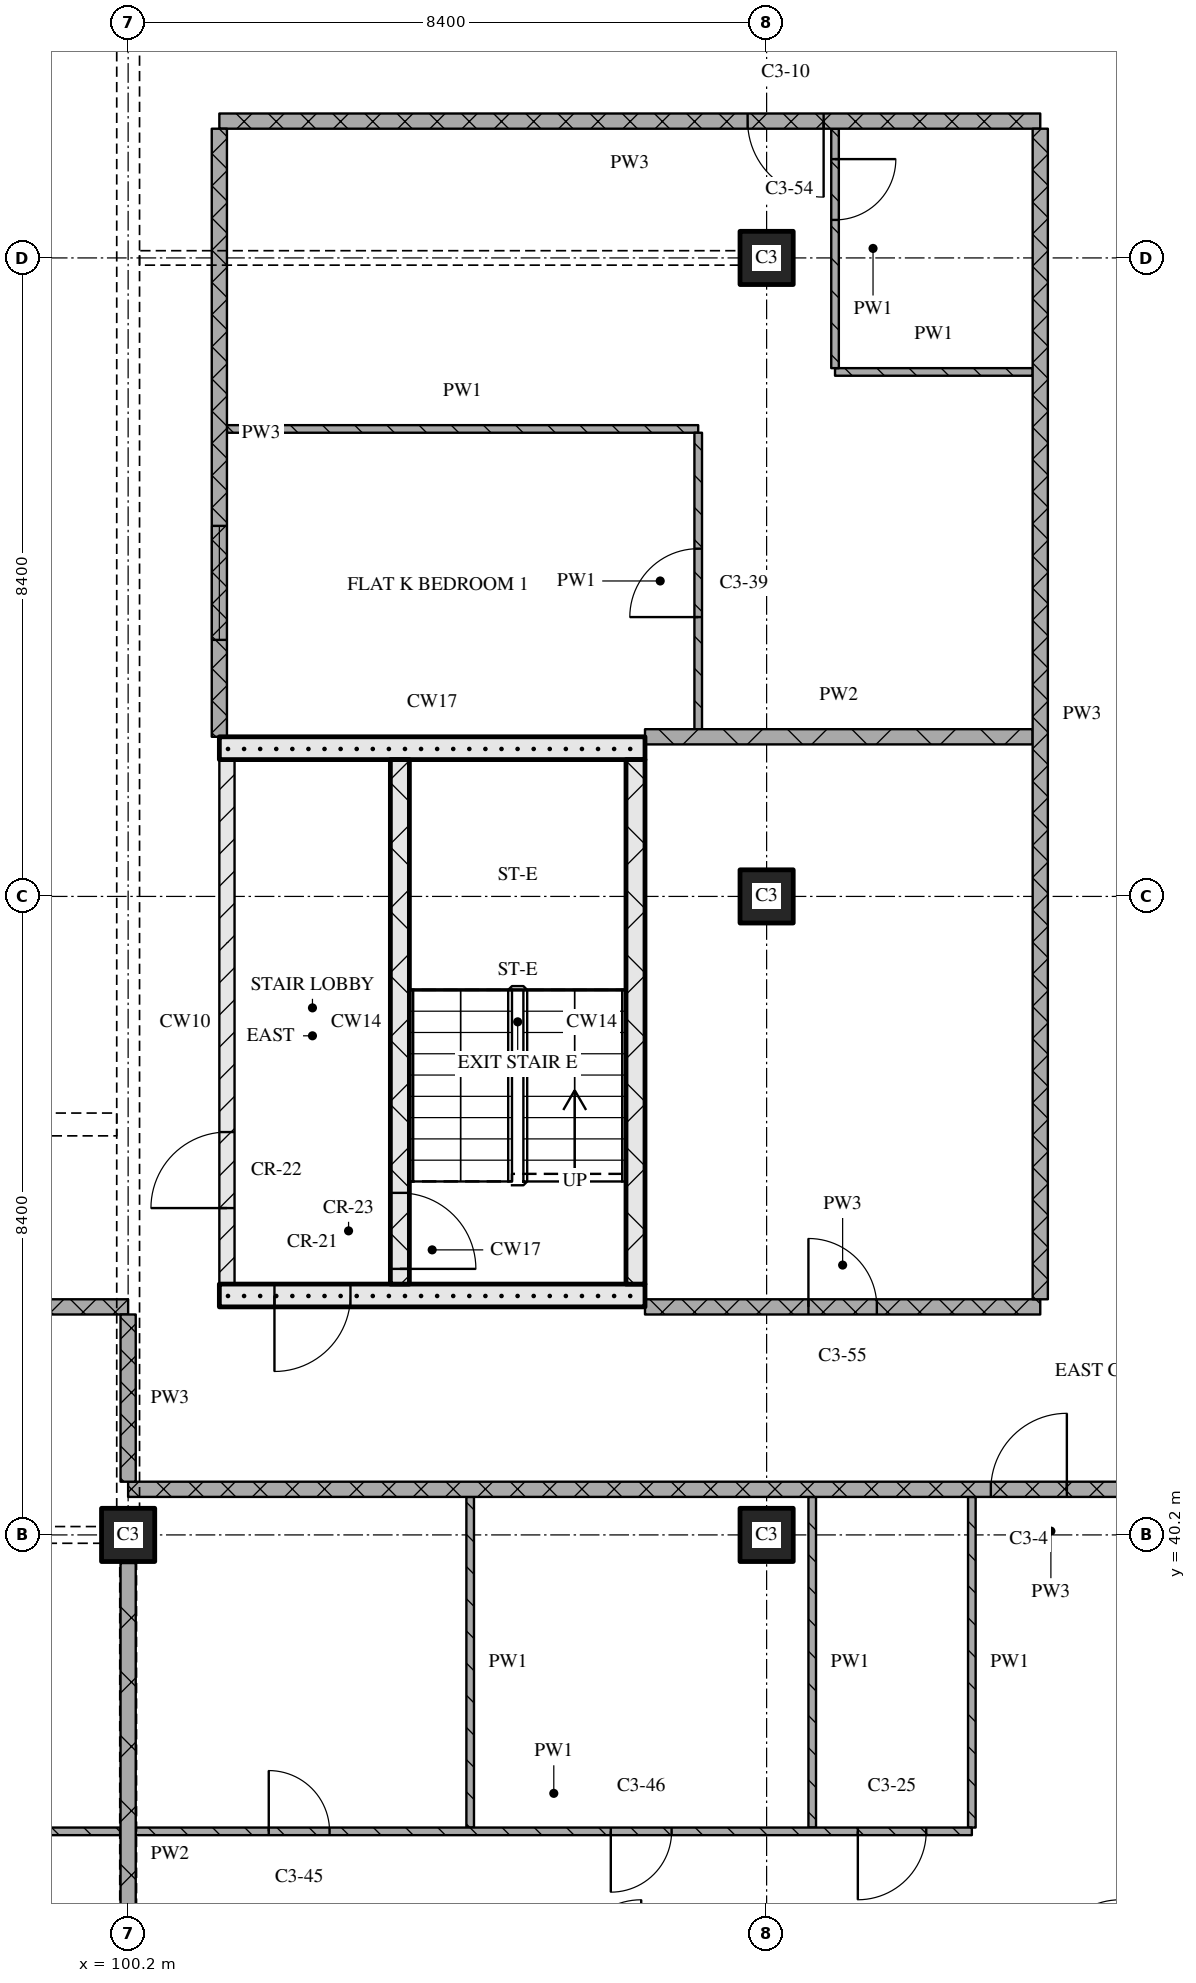
"""IFC4 building model, lengths in metres.
Left out: names, types, materials, properties, quantities, classifications, styles, units other than length and angle.
Written with IfcOpenShell. Run it as: python <this file> out.ifc"""

import sys

from ifc_helpers import new_model, si_unit, direction, frame, frame_2d, origin, origin_2d, place, context, subcontext, project, spatial, rectangle, extrude, element, fill, save


model = new_model("IFC4")
c1 = context("Model", 3, precision=1e-05, world=origin(), true_north=direction((0.0, 1.0)))
c2 = subcontext(c1, "Body", "Model", "MODEL_VIEW")
j1 = project(units=[si_unit("LENGTHUNIT", "METRE"), si_unit("PLANEANGLEUNIT", "RADIAN")], contexts=[c1])
p1 = place(None, origin())
s1 = spatial("IfcSite", under=j1, at=p1, CompositionType="ELEMENT")
p2 = place(p1, origin())
s2 = spatial("IfcBuilding", under=s1, at=p2, CompositionType="ELEMENT")
p3 = place(p2, frame((0.0, 0.0, 172.65)))
s3 = spatial("IfcBuildingStorey", under=s2, at=p3, CompositionType="ELEMENT", Elevation=172.65)
for number, where, z_axis, x_axis in (
    (1, (100.2, 40.2, 0.0), (0.0, 0.0, 1.0), (1.0, 0.0, 0.0)),
    (2, (108.6, 40.2, 0.0), (0.0, 0.0, 1.0), (1.0, 0.0, 0.0)),
    (3, (108.6, 48.6, 0.0), (0.0, 0.0, 1.0), (1.0, 0.0, 0.0)),
    (4, (108.6, 57.0, 0.0), (0.0, 0.0, 1.0), (1.0, 0.0, 0.0)),
):
    element("IfcColumn", number, at=place(p3, frame(where, z_axis=z_axis, x_axis=x_axis)), inside=s3, PredefinedType="COLUMN", context=c2, shape_type="SweptSolid", body=[
        extrude(rectangle(XDim=0.7, YDim=0.7, at=origin_2d()), origin(), (0.0, 0.0, 1.0), 3.6),
    ])
p4 = place(p3, frame((101.4, 43.35, 0.0), z_axis=(0.0, 0.0, 1.0), x_axis=(1.0, 0.0, 0.0)))
e5 = element("IfcWall", 5, at=p4, inside=s3, PredefinedType="SOLIDWALL", context=c2, shape_type="SweptSolid", body=[
    extrude(rectangle(XDim=5.6, YDim=0.3, at=frame_2d((2.8, 0.0))), origin(), (0.0, 0.0, 1.0), 3.32),
])
p5 = place(p4, frame((0.725, 0.0, 0.0)))
e6 = element("IfcOpeningElement", 6, at=p5, cuts=e5, PredefinedType="OPENING", context=c2, shape_type="SweptSolid", body=[
    extrude(rectangle(XDim=1.0, YDim=2.1, at=frame_2d((0.5, 1.05))), frame((0.0, 0.16, 0.0), z_axis=(0.0, -1.0, 0.0), x_axis=(1.0, 0.0, 0.0)), (0.0, 0.0, 1.0), 0.32),
])
p6 = place(p3, frame((101.5, 43.5, 0.0), z_axis=(0.0, 0.0, 1.0), x_axis=(0.0, 1.0, 0.0)))
e7 = element("IfcWall", 7, at=p6, inside=s3, PredefinedType="PARTITIONING", context=c2, shape_type="SweptSolid", body=[
    extrude(rectangle(XDim=6.9, YDim=0.2, at=frame_2d((3.45, 0.0))), origin(), (0.0, 0.0, 1.0), 3.32),
])
p7 = place(p6, frame((1.0, 0.0, 0.0)))
e8 = element("IfcOpeningElement", 8, at=p7, cuts=e7, PredefinedType="OPENING", context=c2, shape_type="SweptSolid", body=[
    extrude(rectangle(XDim=1.0, YDim=2.1, at=frame_2d((0.5, 1.05))), frame((0.0, 0.11, 0.0), z_axis=(0.0, -1.0, 0.0), x_axis=(1.0, 0.0, 0.0)), (0.0, 0.0, 1.0), 0.22),
])
p8 = place(p3, frame((103.775, 43.5, 0.0), z_axis=(0.0, 0.0, 1.0), x_axis=(0.0, 1.0, 0.0)))
e9 = element("IfcWall", 9, at=p8, inside=s3, PredefinedType="SOLIDWALL", context=c2, shape_type="SweptSolid", body=[
    extrude(rectangle(XDim=6.9, YDim=0.25, at=frame_2d((3.45, 0.0))), origin(), (0.0, 0.0, 1.0), 3.32),
])
p9 = place(p8, frame((0.2, 0.0, 0.0)))
e10 = element("IfcOpeningElement", 10, at=p9, cuts=e9, PredefinedType="OPENING", context=c2, shape_type="SweptSolid", body=[
    extrude(rectangle(XDim=1.0, YDim=2.1, at=frame_2d((0.5, 1.05))), frame((0.0, 0.135, 0.0), z_axis=(0.0, -1.0, 0.0), x_axis=(1.0, 0.0, 0.0)), (0.0, 0.0, 1.0), 0.27),
])
p10 = place(p3, frame((106.875, 43.5, 0.0), z_axis=(0.0, 0.0, 1.0), x_axis=(0.0, 1.0, 0.0)))
e11 = element("IfcWall", 11, at=p10, inside=s3, PredefinedType="SOLIDWALL", context=c2, shape_type="SweptSolid", body=[
    extrude(rectangle(XDim=6.9, YDim=0.25, at=frame_2d((3.45, 0.0))), origin(), (0.0, 0.0, 1.0), 3.32),
])
p11 = place(p3, frame((101.4, 50.55, 0.0), z_axis=(0.0, 0.0, 1.0), x_axis=(1.0, 0.0, 0.0)))
e12 = element("IfcWall", 12, at=p11, inside=s3, PredefinedType="SOLIDWALL", context=c2, shape_type="SweptSolid", body=[
    extrude(rectangle(XDim=5.6, YDim=0.3, at=frame_2d((2.8, 0.0))), origin(), (0.0, 0.0, 1.0), 3.32),
])
p12 = place(p3, frame((124.48, 40.8, 0.0), z_axis=(0.0, 0.0, 1.0), x_axis=(-1.0, 0.0, 0.0)))
e13 = element("IfcWall", 13, at=p12, inside=s3, PredefinedType="PARTITIONING", context=c2, shape_type="SweptSolid", body=[
    extrude(rectangle(XDim=24.28, YDim=0.2, at=frame_2d((12.14, 0.0))), origin(), (0.0, 0.0, 1.0), 3.32),
])
p13 = place(p12, frame((11.93, 0.0, 0.0)))
e14 = element("IfcOpeningElement", 14, at=p13, cuts=e13, PredefinedType="OPENING", context=c2, shape_type="SweptSolid", body=[
    extrude(rectangle(XDim=1.0, YDim=2.1, at=frame_2d((0.5, 1.05))), frame((0.0, 0.11, 0.0), z_axis=(0.0, -1.0, 0.0), x_axis=(1.0, 0.0, 0.0)), (0.0, 0.0, 1.0), 0.22),
])
p14 = place(p3, frame((100.2, 43.2, 0.0), z_axis=(0.0, 0.0, 1.0), x_axis=(-1.0, 0.0, 0.0)))
e15 = element("IfcWall", 15, at=p14, inside=s3, PredefinedType="PARTITIONING", context=c2, shape_type="SweptSolid", body=[
    extrude(rectangle(XDim=25.2, YDim=0.2, at=frame_2d((12.6, 0.0))), origin(), (0.0, 0.0, 1.0), 3.32),
])
p15 = place(p14, frame((4.45, 0.0, 0.0)))
e16 = element("IfcOpeningElement", 16, at=p15, cuts=e15, PredefinedType="OPENING", context=c2, shape_type="SweptSolid", body=[
    extrude(rectangle(XDim=1.0, YDim=2.1, at=frame_2d((0.5, 1.05))), frame((0.0, 0.11, 0.0), z_axis=(0.0, -1.0, 0.0), x_axis=(1.0, 0.0, 0.0)), (0.0, 0.0, 1.0), 0.22),
])
p16 = place(p14, frame((17.05, 0.0, 0.0)))
e17 = element("IfcOpeningElement", 17, at=p16, cuts=e15, PredefinedType="OPENING", context=c2, shape_type="SweptSolid", body=[
    extrude(rectangle(XDim=1.0, YDim=2.1, at=frame_2d((0.5, 1.05))), frame((0.0, 0.11, 0.0), z_axis=(0.0, -1.0, 0.0), x_axis=(1.0, 0.0, 0.0)), (0.0, 0.0, 1.0), 0.22),
])
p17 = place(p3, frame((107.0, 43.2, 0.0), z_axis=(0.0, 0.0, 1.0), x_axis=(1.0, 0.0, 0.0)))
e18 = element("IfcWall", 18, at=p17, inside=s3, PredefinedType="PARTITIONING", context=c2, shape_type="SweptSolid", body=[
    extrude(rectangle(XDim=5.2, YDim=0.2, at=frame_2d((2.6, 0.0))), origin(), (0.0, 0.0, 1.0), 3.32),
])
p18 = place(p17, frame((2.15, 0.0, 0.0)))
e19 = element("IfcOpeningElement", 19, at=p18, cuts=e18, PredefinedType="OPENING", context=c2, shape_type="SweptSolid", body=[
    extrude(rectangle(XDim=0.9, YDim=2.1, at=frame_2d((0.45, 1.05))), frame((0.0, 0.11, 0.0), z_axis=(0.0, -1.0, 0.0), x_axis=(1.0, 0.0, 0.0)), (0.0, 0.0, 1.0), 0.22),
])
p19 = place(p3, frame((107.0, 50.7, 0.0), z_axis=(0.0, 0.0, 1.0), x_axis=(1.0, 0.0, 0.0)))
e20 = element("IfcWall", 20, at=p19, inside=s3, PredefinedType="PARTITIONING", context=c2, shape_type="SweptSolid", body=[
    extrude(rectangle(XDim=5.1, YDim=0.2, at=frame_2d((2.55, 0.0))), origin(), (0.0, 0.0, 1.0), 3.32),
])
p20 = place(p3, frame((101.5, 54.75, 0.0), z_axis=(0.0, 0.0, 1.0), x_axis=(1.0, 0.0, 0.0)))
e21 = element("IfcWall", 21, at=p20, inside=s3, PredefinedType="PARTITIONING", context=c2, shape_type="SweptSolid", body=[
    extrude(rectangle(XDim=6.2, YDim=0.1, at=frame_2d((3.1, 0.0))), origin(), (0.0, 0.0, 1.0), 3.32),
])
p21 = place(p3, frame((109.5, 55.5, 0.0), z_axis=(0.0, 0.0, 1.0), x_axis=(1.0, 0.0, 0.0)))
e22 = element("IfcWall", 22, at=p21, inside=s3, PredefinedType="PARTITIONING", context=c2, shape_type="SweptSolid", body=[
    extrude(rectangle(XDim=2.6, YDim=0.1, at=frame_2d((1.3, 0.0))), origin(), (0.0, 0.0, 1.0), 3.32),
])
p22 = place(p3, frame((112.2, 58.8, 0.0), z_axis=(0.0, 0.0, 1.0), x_axis=(-1.0, 0.0, 0.0)))
e23 = element("IfcWall", 23, at=p22, inside=s3, PredefinedType="PARTITIONING", context=c2, shape_type="SweptSolid", body=[
    extrude(rectangle(XDim=10.8, YDim=0.2, at=frame_2d((5.4, 0.0))), origin(), (0.0, 0.0, 1.0), 3.32),
])
p23 = place(p22, frame((2.85, 0.0, 0.0)))
e24 = element("IfcOpeningElement", 24, at=p23, cuts=e23, PredefinedType="OPENING", context=c2, shape_type="SweptSolid", body=[
    extrude(rectangle(XDim=1.0, YDim=2.1, at=frame_2d((0.5, 1.05))), frame((0.0, 0.11, 0.0), z_axis=(0.0, -1.0, 0.0), x_axis=(1.0, 0.0, 0.0)), (0.0, 0.0, 1.0), 0.22),
])
p24 = place(p3, frame((100.2, 43.1, 0.0), z_axis=(0.0, 0.0, 1.0), x_axis=(0.0, -1.0, 0.0)))
e25 = element("IfcWall", 25, at=p24, inside=s3, PredefinedType="PARTITIONING", context=c2, shape_type="SweptSolid", body=[
    extrude(rectangle(XDim=2.2, YDim=0.2, at=frame_2d((1.1, 0.0))), origin(), (0.0, 0.0, 1.0), 2.43),
])
p25 = place(p3, frame((100.2, 39.83, 0.0), z_axis=(0.0, 0.0, 1.0), x_axis=(0.0, -1.0, 0.0)))
e26 = element("IfcWall", 26, at=p25, inside=s3, PredefinedType="PARTITIONING", context=c2, shape_type="SweptSolid", body=[
    extrude(rectangle(XDim=7.66, YDim=0.2, at=frame_2d((3.83, 0.0))), origin(), (0.0, 0.0, 1.0), 2.72),
])
p26 = place(p3, frame((101.4, 58.7, 0.0), z_axis=(0.0, 0.0, 1.0), x_axis=(0.0, -1.0, 0.0)))
e27 = element("IfcWall", 27, at=p26, inside=s3, PredefinedType="PARTITIONING", context=c2, shape_type="SweptSolid", body=[
    extrude(rectangle(XDim=8.0, YDim=0.2, at=frame_2d((4.0, 0.0))), origin(), (0.0, 0.0, 1.0), 3.32),
])
p27 = place(p26, frame((5.225, 0.0, 0.9)))
e28 = element("IfcOpeningElement", 28, at=p27, cuts=e27, PredefinedType="OPENING", context=c2, shape_type="SweptSolid", body=[
    extrude(rectangle(XDim=1.5, YDim=1.5, at=frame_2d((0.75, 0.75))), frame((0.0, 0.11, 0.0), z_axis=(0.0, -1.0, 0.0), x_axis=(1.0, 0.0, 0.0)), (0.0, 0.0, 1.0), 0.22),
])
p28 = place(p3, frame((104.7, 40.7, 0.0), z_axis=(0.0, 0.0, 1.0), x_axis=(0.0, -1.0, 0.0)))
e29 = element("IfcWall", 29, at=p28, inside=s3, PredefinedType="PARTITIONING", context=c2, shape_type="SweptSolid", body=[
    extrude(rectangle(XDim=4.35, YDim=0.1, at=frame_2d((2.175, 0.0))), origin(), (0.0, 0.0, 1.0), 3.32),
])
p29 = place(p3, frame((107.7, 50.8, 0.0), z_axis=(0.0, 0.0, 1.0), x_axis=(0.0, 1.0, 0.0)))
e30 = element("IfcWall", 30, at=p29, inside=s3, PredefinedType="PARTITIONING", context=c2, shape_type="SweptSolid", body=[
    extrude(rectangle(XDim=3.9, YDim=0.1, at=frame_2d((1.95, 0.0))), origin(), (0.0, 0.0, 1.0), 3.32),
])
p30 = place(p29, frame((1.475, 0.0, 0.0)))
e31 = element("IfcOpeningElement", 31, at=p30, cuts=e30, PredefinedType="OPENING", context=c2, shape_type="SweptSolid", body=[
    extrude(rectangle(XDim=0.9, YDim=2.1, at=frame_2d((0.45, 1.05))), frame((0.0, 0.06, 0.0), z_axis=(0.0, -1.0, 0.0), x_axis=(1.0, 0.0, 0.0)), (0.0, 0.0, 1.0), 0.12),
])
p31 = place(p3, frame((109.2, 40.7, 0.0), z_axis=(0.0, 0.0, 1.0), x_axis=(0.0, -1.0, 0.0)))
e32 = element("IfcWall", 32, at=p31, inside=s3, PredefinedType="PARTITIONING", context=c2, shape_type="SweptSolid", body=[
    extrude(rectangle(XDim=4.35, YDim=0.1, at=frame_2d((2.175, 0.0))), origin(), (0.0, 0.0, 1.0), 3.32),
])
p32 = place(p3, frame((109.5, 58.7, 0.0), z_axis=(0.0, 0.0, 1.0), x_axis=(0.0, -1.0, 0.0)))
e33 = element("IfcWall", 33, at=p32, inside=s3, PredefinedType="PARTITIONING", context=c2, shape_type="SweptSolid", body=[
    extrude(rectangle(XDim=3.15, YDim=0.1, at=frame_2d((1.575, 0.0))), origin(), (0.0, 0.0, 1.0), 3.32),
])
p33 = place(p32, frame((0.4, 0.0, 0.0)))
e34 = element("IfcOpeningElement", 34, at=p33, cuts=e33, PredefinedType="OPENING", context=c2, shape_type="SweptSolid", body=[
    extrude(rectangle(XDim=0.8, YDim=2.1, at=frame_2d((0.4, 1.05))), frame((0.0, 0.06, 0.0), z_axis=(0.0, -1.0, 0.0), x_axis=(1.0, 0.0, 0.0)), (0.0, 0.0, 1.0), 0.12),
])
p34 = place(p3, frame((111.3, 40.7, 0.0), z_axis=(0.0, 0.0, 1.0), x_axis=(0.0, -1.0, 0.0)))
e35 = element("IfcWall", 35, at=p34, inside=s3, PredefinedType="PARTITIONING", context=c2, shape_type="SweptSolid", body=[
    extrude(rectangle(XDim=4.35, YDim=0.1, at=frame_2d((2.175, 0.0))), origin(), (0.0, 0.0, 1.0), 3.32),
])
p35 = place(p3, frame((112.2, 58.7, 0.0), z_axis=(0.0, 0.0, 1.0), x_axis=(0.0, -1.0, 0.0)))
e36 = element("IfcWall", 36, at=p35, inside=s3, PredefinedType="PARTITIONING", context=c2, shape_type="SweptSolid", body=[
    extrude(rectangle(XDim=15.4, YDim=0.2, at=frame_2d((7.7, 0.0))), origin(), (0.0, 0.0, 1.0), 3.32),
])
p36 = place(p3, frame((100.1, 36.3, 0.0), z_axis=(0.0, 0.0, 1.0), x_axis=(-1.0, 0.0, 0.0)))
e37 = element("IfcWall", 37, at=p36, inside=s3, PredefinedType="PARTITIONING", context=c2, shape_type="SweptSolid", body=[
    extrude(rectangle(XDim=4.1, YDim=0.1, at=frame_2d((2.05, 0.0))), origin(), (0.0, 0.0, 1.0), 3.32),
])
p37 = place(p36, frame((1.55, 0.0, 0.0)))
e38 = element("IfcOpeningElement", 38, at=p37, cuts=e37, PredefinedType="OPENING", context=c2, shape_type="SweptSolid", body=[
    extrude(rectangle(XDim=0.9, YDim=2.1, at=frame_2d((0.45, 1.05))), frame((0.0, 0.06, 0.0), z_axis=(0.0, -1.0, 0.0), x_axis=(1.0, 0.0, 0.0)), (0.0, 0.0, 1.0), 0.12),
])
p38 = place(p3, frame((100.3, 36.3, 0.0), z_axis=(0.0, 0.0, 1.0), x_axis=(1.0, 0.0, 0.0)))
e39 = element("IfcWall", 39, at=p38, inside=s3, PredefinedType="PARTITIONING", context=c2, shape_type="SweptSolid", body=[
    extrude(rectangle(XDim=11.0, YDim=0.1, at=frame_2d((5.5, 0.0))), origin(), (0.0, 0.0, 1.0), 3.32),
])
p39 = place(p38, frame((1.75, 0.0, 0.0)))
e40 = element("IfcOpeningElement", 40, at=p39, cuts=e39, PredefinedType="OPENING", context=c2, shape_type="SweptSolid", body=[
    extrude(rectangle(XDim=0.8, YDim=2.1, at=frame_2d((0.4, 1.05))), frame((0.0, 0.06, 0.0), z_axis=(0.0, -1.0, 0.0), x_axis=(1.0, 0.0, 0.0)), (0.0, 0.0, 1.0), 0.12),
])
p40 = place(p38, frame((6.25, 0.0, 0.0)))
e41 = element("IfcOpeningElement", 41, at=p40, cuts=e39, PredefinedType="OPENING", context=c2, shape_type="SweptSolid", body=[
    extrude(rectangle(XDim=0.8, YDim=2.1, at=frame_2d((0.4, 1.05))), frame((0.0, 0.06, 0.0), z_axis=(0.0, -1.0, 0.0), x_axis=(1.0, 0.0, 0.0)), (0.0, 0.0, 1.0), 0.12),
])
p41 = place(p38, frame((9.5, 0.0, 0.0)))
e42 = element("IfcOpeningElement", 42, at=p41, cuts=e39, PredefinedType="OPENING", context=c2, shape_type="SweptSolid", body=[
    extrude(rectangle(XDim=0.9, YDim=2.1, at=frame_2d((0.45, 1.05))), frame((0.0, 0.06, 0.0), z_axis=(0.0, -1.0, 0.0), x_axis=(1.0, 0.0, 0.0)), (0.0, 0.0, 1.0), 0.12),
])
p42 = place(p5, origin())
e43 = element("IfcDoor", 43, at=p42, inside=s3, OperationType="SINGLE_SWING_RIGHT", PredefinedType="DOOR", context=c2, shape_type="SweptSolid", body=[
    extrude(rectangle(XDim=1.0, YDim=2.1, at=frame_2d((0.5, 1.05))), frame((0.0, 0.025, 0.0), z_axis=(0.0, -1.0, 0.0), x_axis=(1.0, 0.0, 0.0)), (0.0, 0.0, 1.0), 0.05),
])
fill(e6, e43)
p43 = place(p9, origin())
e44 = element("IfcDoor", 44, at=p43, inside=s3, OperationType="SINGLE_SWING_RIGHT", PredefinedType="DOOR", context=c2, shape_type="SweptSolid", body=[
    extrude(rectangle(XDim=1.0, YDim=2.1, at=frame_2d((0.5, 1.05))), frame((0.0, 0.025, 0.0), z_axis=(0.0, -1.0, 0.0), x_axis=(1.0, 0.0, 0.0)), (0.0, 0.0, 1.0), 0.05),
])
fill(e10, e44)
p44 = place(p7, origin())
e45 = element("IfcDoor", 45, at=p44, inside=s3, OperationType="SINGLE_SWING_LEFT", PredefinedType="DOOR", context=c2, shape_type="SweptSolid", body=[
    extrude(rectangle(XDim=1.0, YDim=2.1, at=frame_2d((0.5, 1.05))), frame((0.0, 0.025, 0.0), z_axis=(0.0, -1.0, 0.0), x_axis=(1.0, 0.0, 0.0)), (0.0, 0.0, 1.0), 0.05),
])
fill(e8, e45)
p45 = place(p13, origin())
e46 = element("IfcDoor", 46, at=p45, inside=s3, OperationType="SINGLE_SWING_RIGHT", PredefinedType="DOOR", context=c2, shape_type="SweptSolid", body=[
    extrude(rectangle(XDim=1.0, YDim=2.1, at=frame_2d((0.5, 1.05))), frame((0.0, 0.025, 0.0), z_axis=(0.0, -1.0, 0.0), x_axis=(1.0, 0.0, 0.0)), (0.0, 0.0, 1.0), 0.05),
])
fill(e14, e46)
p46 = place(p18, origin())
e47 = element("IfcDoor", 47, at=p46, inside=s3, OperationType="SINGLE_SWING_LEFT", PredefinedType="DOOR", context=c2, shape_type="SweptSolid", body=[
    extrude(rectangle(XDim=0.9, YDim=2.1, at=frame_2d((0.45, 1.05))), frame((0.0, 0.025, 0.0), z_axis=(0.0, -1.0, 0.0), x_axis=(1.0, 0.0, 0.0)), (0.0, 0.0, 1.0), 0.05),
])
fill(e19, e47)
p47 = place(p23, origin())
e48 = element("IfcDoor", 48, at=p47, inside=s3, OperationType="SINGLE_SWING_LEFT", PredefinedType="DOOR", context=c2, shape_type="SweptSolid", body=[
    extrude(rectangle(XDim=1.0, YDim=2.1, at=frame_2d((0.5, 1.05))), frame((0.0, 0.025, 0.0), z_axis=(0.0, -1.0, 0.0), x_axis=(1.0, 0.0, 0.0)), (0.0, 0.0, 1.0), 0.05),
])
fill(e24, e48)
p48 = place(p30, origin())
e49 = element("IfcDoor", 49, at=p48, inside=s3, OperationType="SINGLE_SWING_LEFT", PredefinedType="DOOR", context=c2, shape_type="SweptSolid", body=[
    extrude(rectangle(XDim=0.9, YDim=2.1, at=frame_2d((0.45, 1.05))), frame((0.0, 0.025, 0.0), z_axis=(0.0, -1.0, 0.0), x_axis=(1.0, 0.0, 0.0)), (0.0, 0.0, 1.0), 0.05),
])
fill(e31, e49)
p49 = place(p33, origin())
e50 = element("IfcDoor", 50, at=p49, inside=s3, OperationType="SINGLE_SWING_LEFT", PredefinedType="DOOR", context=c2, shape_type="SweptSolid", body=[
    extrude(rectangle(XDim=0.8, YDim=2.1, at=frame_2d((0.4, 1.05))), frame((0.0, 0.025, 0.0), z_axis=(0.0, -1.0, 0.0), x_axis=(1.0, 0.0, 0.0)), (0.0, 0.0, 1.0), 0.05),
])
fill(e34, e50)
p50 = place(p39, origin())
e51 = element("IfcDoor", 51, at=p50, inside=s3, OperationType="SINGLE_SWING_LEFT", PredefinedType="DOOR", context=c2, shape_type="SweptSolid", body=[
    extrude(rectangle(XDim=0.8, YDim=2.1, at=frame_2d((0.4, 1.05))), frame((0.0, 0.025, 0.0), z_axis=(0.0, -1.0, 0.0), x_axis=(1.0, 0.0, 0.0)), (0.0, 0.0, 1.0), 0.05),
])
fill(e40, e51)
p51 = place(p40, origin())
e52 = element("IfcDoor", 52, at=p51, inside=s3, OperationType="SINGLE_SWING_RIGHT", PredefinedType="DOOR", context=c2, shape_type="SweptSolid", body=[
    extrude(rectangle(XDim=0.8, YDim=2.1, at=frame_2d((0.4, 1.05))), frame((0.0, 0.025, 0.0), z_axis=(0.0, -1.0, 0.0), x_axis=(1.0, 0.0, 0.0)), (0.0, 0.0, 1.0), 0.05),
])
fill(e41, e52)
p52 = place(p41, origin())
e53 = element("IfcDoor", 53, at=p52, inside=s3, OperationType="SINGLE_SWING_RIGHT", PredefinedType="DOOR", context=c2, shape_type="SweptSolid", body=[
    extrude(rectangle(XDim=0.9, YDim=2.1, at=frame_2d((0.45, 1.05))), frame((0.0, 0.025, 0.0), z_axis=(0.0, -1.0, 0.0), x_axis=(1.0, 0.0, 0.0)), (0.0, 0.0, 1.0), 0.05),
])
fill(e42, e53)
p53 = place(p27, origin())
e54 = element("IfcWindow", 54, at=p53, inside=s3, PartitioningType="SINGLE_PANEL", PredefinedType="WINDOW", context=c2, shape_type="SweptSolid", body=[
    extrude(rectangle(XDim=1.5, YDim=1.5, at=frame_2d((0.75, 0.75))), frame((0.0, 0.03, 0.0), z_axis=(0.0, -1.0, 0.0), x_axis=(1.0, 0.0, 0.0)), (0.0, 0.0, 1.0), 0.06),
])
fill(e28, e54)
save(model, sys.argv[1])
